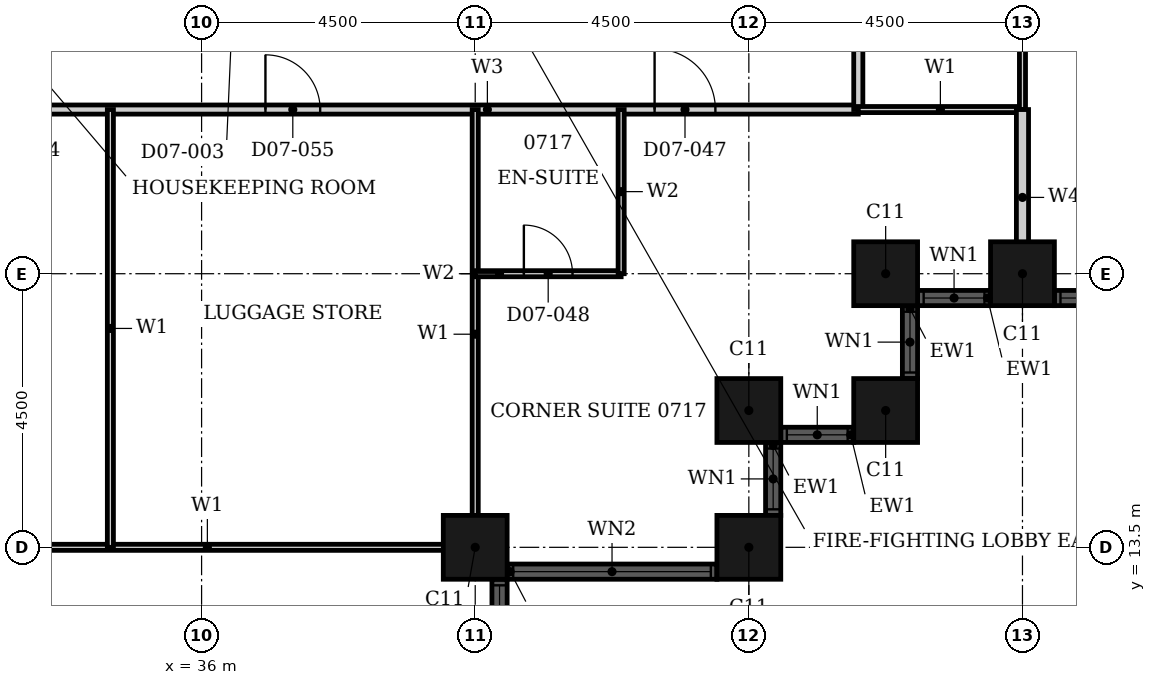
"""IFC4 building model, lengths in metres.
Left out: names, types, materials, properties, quantities, classifications, styles, units other than length and angle.
Written with IfcOpenShell. Run it as: python <this file> out.ifc"""

import sys

from ifc_helpers import new_model, si_unit, direction, frame, frame_2d, origin, origin_2d, place, context, subcontext, project, spatial, rectangle, hollow_rectangle, extrude, element, fill, save


model = new_model("IFC4")
c1 = context("Model", 3, precision=1e-05, world=origin(), true_north=direction((0.0, 1.0)))
c2 = subcontext(c1, "Body", "Model", "MODEL_VIEW")
j1 = project(units=[si_unit("LENGTHUNIT", "METRE"), si_unit("PLANEANGLEUNIT", "RADIAN")], contexts=[c1])
p1 = place(None, origin())
s1 = spatial("IfcSite", under=j1, at=p1, CompositionType="ELEMENT")
p2 = place(p1, origin())
s2 = spatial("IfcBuilding", under=s1, at=p2, CompositionType="ELEMENT")
p3 = place(p2, frame((0.0, 0.0, 37.2)))
s3 = spatial("IfcBuildingStorey", under=s2, at=p3, CompositionType="ELEMENT", Elevation=37.2)
for number, where, z_axis, x_axis in (
    (1, (40.5, 13.5, 0.0), (0.0, 0.0, 1.0), (1.0, 0.0, 0.0)),
    (2, (45.0, 13.5, 0.0), (0.0, 0.0, 1.0), (1.0, 0.0, 0.0)),
    (3, (45.0, 15.75, 0.0), (0.0, 0.0, 1.0), (1.0, 0.0, 0.0)),
    (4, (47.25, 15.75, 0.0), (0.0, 0.0, 1.0), (1.0, 0.0, 0.0)),
    (5, (47.25, 18.0, 0.0), (0.0, 0.0, 1.0), (1.0, 0.0, 0.0)),
    (6, (49.5, 18.0, 0.0), (0.0, 0.0, 1.0), (1.0, 0.0, 0.0)),
):
    element("IfcColumn", number, at=place(p3, frame(where, z_axis=z_axis, x_axis=x_axis)), inside=s3, PredefinedType="COLUMN", context=c2, shape_type="SweptSolid", body=[
        extrude(hollow_rectangle(XDim=1.05, YDim=1.05, WallThickness=0.034, at=origin_2d()), origin(), (0.0, 0.0, 1.0), 3.6),
    ])
p4 = place(p3, frame((40.9, 5.025, 0.0), z_axis=(0.0, 0.0, 1.0), x_axis=(0.0, 1.0, 0.0)))
e7 = element("IfcWall", 7, at=p4, inside=s3, PredefinedType="SOLIDWALL", context=c2, shape_type="SweptSolid", body=[
    extrude(rectangle(XDim=7.95, YDim=0.25, at=frame_2d((3.975, 0.0))), origin(), (0.0, 0.0, 1.0), 3.6),
])
p5 = place(p4, frame((0.1, 0.0, 0.9)))
e8 = element("IfcOpeningElement", 8, at=p5, cuts=e7, PredefinedType="OPENING", context=c2, shape_type="SweptSolid", body=[
    extrude(rectangle(XDim=3.25, YDim=2.08, at=frame_2d((1.625, 1.04))), frame((0.0, 0.135, 0.0), z_axis=(0.0, -1.0, 0.0), x_axis=(1.0, 0.0, 0.0)), (0.0, 0.0, 1.0), 0.27),
])
p6 = place(p4, frame((4.6, 0.0, 0.9)))
e9 = element("IfcOpeningElement", 9, at=p6, cuts=e7, PredefinedType="OPENING", context=c2, shape_type="SweptSolid", body=[
    extrude(rectangle(XDim=3.25, YDim=2.08, at=frame_2d((1.625, 1.04))), frame((0.0, 0.135, 0.0), z_axis=(0.0, -1.0, 0.0), x_axis=(1.0, 0.0, 0.0)), (0.0, 0.0, 1.0), 0.27),
])
p7 = place(p3, frame((41.025, 13.1, 0.0), z_axis=(0.0, 0.0, 1.0), x_axis=(1.0, 0.0, 0.0)))
e10 = element("IfcWall", 10, at=p7, inside=s3, PredefinedType="SOLIDWALL", context=c2, shape_type="SweptSolid", body=[
    extrude(rectangle(XDim=3.45, YDim=0.25, at=frame_2d((1.725, 0.0))), origin(), (0.0, 0.0, 1.0), 3.6),
])
p8 = place(p7, frame((0.1, 0.0, 0.9)))
e11 = element("IfcOpeningElement", 11, at=p8, cuts=e10, PredefinedType="OPENING", context=c2, shape_type="SweptSolid", body=[
    extrude(rectangle(XDim=3.25, YDim=2.08, at=frame_2d((1.625, 1.04))), frame((0.0, 0.135, 0.0), z_axis=(0.0, -1.0, 0.0), x_axis=(1.0, 0.0, 0.0)), (0.0, 0.0, 1.0), 0.27),
])
p9 = place(p3, frame((45.4, 14.025, 0.0), z_axis=(0.0, 0.0, 1.0), x_axis=(0.0, 1.0, 0.0)))
e12 = element("IfcWall", 12, at=p9, inside=s3, PredefinedType="SOLIDWALL", context=c2, shape_type="SweptSolid", body=[
    extrude(rectangle(XDim=1.2, YDim=0.25, at=frame_2d((0.6, 0.0))), origin(), (0.0, 0.0, 1.0), 3.6),
])
p10 = place(p9, frame((0.1, 0.0, 0.9)))
e13 = element("IfcOpeningElement", 13, at=p10, cuts=e12, PredefinedType="OPENING", context=c2, shape_type="SweptSolid", body=[
    extrude(rectangle(XDim=1.0, YDim=2.08, at=frame_2d((0.5, 1.04))), frame((0.0, 0.135, 0.0), z_axis=(0.0, -1.0, 0.0), x_axis=(1.0, 0.0, 0.0)), (0.0, 0.0, 1.0), 0.27),
])
p11 = place(p3, frame((45.525, 15.35, 0.0), z_axis=(0.0, 0.0, 1.0), x_axis=(1.0, 0.0, 0.0)))
e14 = element("IfcWall", 14, at=p11, inside=s3, PredefinedType="SOLIDWALL", context=c2, shape_type="SweptSolid", body=[
    extrude(rectangle(XDim=1.2, YDim=0.25, at=frame_2d((0.6, 0.0))), origin(), (0.0, 0.0, 1.0), 3.6),
])
p12 = place(p11, frame((0.1, 0.0, 0.9)))
e15 = element("IfcOpeningElement", 15, at=p12, cuts=e14, PredefinedType="OPENING", context=c2, shape_type="SweptSolid", body=[
    extrude(rectangle(XDim=1.0, YDim=2.08, at=frame_2d((0.5, 1.04))), frame((0.0, 0.135, 0.0), z_axis=(0.0, -1.0, 0.0), x_axis=(1.0, 0.0, 0.0)), (0.0, 0.0, 1.0), 0.27),
])
p13 = place(p3, frame((47.65, 16.275, 0.0), z_axis=(0.0, 0.0, 1.0), x_axis=(0.0, 1.0, 0.0)))
e16 = element("IfcWall", 16, at=p13, inside=s3, PredefinedType="SOLIDWALL", context=c2, shape_type="SweptSolid", body=[
    extrude(rectangle(XDim=1.2, YDim=0.25, at=frame_2d((0.6, 0.0))), origin(), (0.0, 0.0, 1.0), 3.6),
])
p14 = place(p13, frame((0.1, 0.0, 0.9)))
e17 = element("IfcOpeningElement", 17, at=p14, cuts=e16, PredefinedType="OPENING", context=c2, shape_type="SweptSolid", body=[
    extrude(rectangle(XDim=1.0, YDim=2.08, at=frame_2d((0.5, 1.04))), frame((0.0, 0.135, 0.0), z_axis=(0.0, -1.0, 0.0), x_axis=(1.0, 0.0, 0.0)), (0.0, 0.0, 1.0), 0.27),
])
p15 = place(p3, frame((47.775, 17.6, 0.0), z_axis=(0.0, 0.0, 1.0), x_axis=(1.0, 0.0, 0.0)))
e18 = element("IfcWall", 18, at=p15, inside=s3, PredefinedType="SOLIDWALL", context=c2, shape_type="SweptSolid", body=[
    extrude(rectangle(XDim=1.2, YDim=0.25, at=frame_2d((0.6, 0.0))), origin(), (0.0, 0.0, 1.0), 3.6),
])
p16 = place(p15, frame((0.1, 0.0, 0.9)))
e19 = element("IfcOpeningElement", 19, at=p16, cuts=e18, PredefinedType="OPENING", context=c2, shape_type="SweptSolid", body=[
    extrude(rectangle(XDim=1.0, YDim=2.08, at=frame_2d((0.5, 1.04))), frame((0.0, 0.135, 0.0), z_axis=(0.0, -1.0, 0.0), x_axis=(1.0, 0.0, 0.0)), (0.0, 0.0, 1.0), 0.27),
])
p17 = place(p3, frame((50.025, 17.6, 0.0), z_axis=(0.0, 0.0, 1.0), x_axis=(1.0, 0.0, 0.0)))
e20 = element("IfcWall", 20, at=p17, inside=s3, PredefinedType="SOLIDWALL", context=c2, shape_type="SweptSolid", body=[
    extrude(rectangle(XDim=7.95, YDim=0.25, at=frame_2d((3.975, 0.0))), origin(), (0.0, 0.0, 1.0), 3.6),
])
p18 = place(p17, frame((0.1, 0.0, 0.9)))
e21 = element("IfcOpeningElement", 21, at=p18, cuts=e20, PredefinedType="OPENING", context=c2, shape_type="SweptSolid", body=[
    extrude(rectangle(XDim=3.25, YDim=2.08, at=frame_2d((1.625, 1.04))), frame((0.0, 0.135, 0.0), z_axis=(0.0, -1.0, 0.0), x_axis=(1.0, 0.0, 0.0)), (0.0, 0.0, 1.0), 0.27),
])
p19 = place(p17, frame((4.6, 0.0, 0.9)))
e22 = element("IfcOpeningElement", 22, at=p19, cuts=e20, PredefinedType="OPENING", context=c2, shape_type="SweptSolid", body=[
    extrude(rectangle(XDim=3.25, YDim=2.08, at=frame_2d((1.625, 1.04))), frame((0.0, 0.135, 0.0), z_axis=(0.0, -1.0, 0.0), x_axis=(1.0, 0.0, 0.0)), (0.0, 0.0, 1.0), 0.27),
])
p20 = place(p3, frame((31.5, 20.7, 0.0), z_axis=(0.0, 0.0, 1.0), x_axis=(1.0, 0.0, 0.0)))
e23 = element("IfcWall", 23, at=p20, inside=s3, PredefinedType="PARTITIONING", context=c2, shape_type="SweptSolid", body=[
    extrude(rectangle(XDim=15.3, YDim=0.15, at=frame_2d((7.65, 0.0))), origin(), (0.0, 0.0, 1.0), 3.3),
])
p21 = place(p20, frame((11.95, 0.0, 0.0)))
e24 = element("IfcOpeningElement", 24, at=p21, cuts=e23, PredefinedType="OPENING", context=c2, shape_type="SweptSolid", body=[
    extrude(rectangle(XDim=1.0, YDim=2.1, at=frame_2d((0.5, 1.05))), frame((0.0, 0.085, 0.0), z_axis=(0.0, -1.0, 0.0), x_axis=(1.0, 0.0, 0.0)), (0.0, 0.0, 1.0), 0.17),
])
p22 = place(p20, frame((1.05, 0.0, 0.0)))
e25 = element("IfcOpeningElement", 25, at=p22, cuts=e23, PredefinedType="OPENING", context=c2, shape_type="SweptSolid", body=[
    extrude(rectangle(XDim=0.9, YDim=2.1, at=frame_2d((0.45, 1.05))), frame((0.0, 0.085, 0.0), z_axis=(0.0, -1.0, 0.0), x_axis=(1.0, 0.0, 0.0)), (0.0, 0.0, 1.0), 0.17),
])
p23 = place(p20, frame((5.55, 0.0, 0.0)))
e26 = element("IfcOpeningElement", 26, at=p23, cuts=e23, PredefinedType="OPENING", context=c2, shape_type="SweptSolid", body=[
    extrude(rectangle(XDim=0.9, YDim=2.1, at=frame_2d((0.45, 1.05))), frame((0.0, 0.085, 0.0), z_axis=(0.0, -1.0, 0.0), x_axis=(1.0, 0.0, 0.0)), (0.0, 0.0, 1.0), 0.17),
])
p24 = place(p3, frame((46.8, 20.7, 0.0), z_axis=(0.0, 0.0, 1.0), x_axis=(0.0, 1.0, 0.0)))
e27 = element("IfcWall", 27, at=p24, inside=s3, PredefinedType="PARTITIONING", context=c2, shape_type="SweptSolid", body=[
    extrude(rectangle(XDim=6.3, YDim=0.15, at=frame_2d((3.15, 0.0))), origin(), (0.0, 0.0, 1.0), 3.3),
])
p25 = place(p24, frame((2.65, 0.0, 0.0)))
e28 = element("IfcOpeningElement", 28, at=p25, cuts=e27, PredefinedType="OPENING", context=c2, shape_type="SweptSolid", body=[
    extrude(rectangle(XDim=0.9, YDim=2.1, at=frame_2d((0.45, 1.05))), frame((0.0, 0.085, 0.0), z_axis=(0.0, -1.0, 0.0), x_axis=(1.0, 0.0, 0.0)), (0.0, 0.0, 1.0), 0.17),
])
p26 = place(p3, frame((31.5, 13.5, 0.0), z_axis=(0.0, 0.0, 1.0), x_axis=(1.0, 0.0, 0.0)))
e29 = element("IfcWall", 29, at=p26, inside=s3, PredefinedType="PARTITIONING", context=c2, shape_type="SweptSolid", body=[
    extrude(rectangle(XDim=9.19, YDim=0.1, at=frame_2d((4.595, 0.0))), origin(), (0.0, 0.0, 1.0), 2.38),
])
p27 = place(p3, frame((46.8, 20.7, 0.0), z_axis=(0.0, 0.0, 1.0), x_axis=(1.0, 0.0, 0.0)))
e30 = element("IfcWall", 30, at=p27, inside=s3, PredefinedType="PARTITIONING", context=c2, shape_type="SweptSolid", body=[
    extrude(rectangle(XDim=2.7, YDim=0.1, at=frame_2d((1.35, 0.0))), origin(), (0.0, 0.0, 1.0), 3.3),
])
p28 = place(p3, frame((34.5, 13.5, 0.0), z_axis=(0.0, 0.0, 1.0), x_axis=(0.0, 1.0, 0.0)))
e31 = element("IfcWall", 31, at=p28, inside=s3, PredefinedType="PARTITIONING", context=c2, shape_type="SweptSolid", body=[
    extrude(rectangle(XDim=7.2, YDim=0.1, at=frame_2d((3.6, 0.0))), origin(), (0.0, 0.0, 1.0), 3.3),
])
p29 = place(p3, frame((40.5, 13.31, 0.0), z_axis=(0.0, 0.0, 1.0), x_axis=(0.0, 1.0, 0.0)))
e32 = element("IfcWall", 32, at=p29, inside=s3, PredefinedType="PARTITIONING", context=c2, shape_type="SweptSolid", body=[
    extrude(rectangle(XDim=7.39, YDim=0.1, at=frame_2d((3.695, 0.0))), origin(), (0.0, 0.0, 1.0), 3.3),
])
p30 = place(p3, frame((49.5, 20.7, 0.0), z_axis=(0.0, 0.0, 1.0), x_axis=(0.0, 1.0, 0.0)))
e33 = element("IfcWall", 33, at=p30, inside=s3, PredefinedType="PARTITIONING", context=c2, shape_type="SweptSolid", body=[
    extrude(rectangle(XDim=6.3, YDim=0.1, at=frame_2d((3.15, 0.0))), origin(), (0.0, 0.0, 1.0), 2.38),
])
p31 = place(p3, frame((49.5, 17.81, 0.0), z_axis=(0.0, 0.0, 1.0), x_axis=(0.0, 1.0, 0.0)))
e34 = element("IfcWall", 34, at=p31, inside=s3, PredefinedType="PARTITIONING", context=c2, shape_type="SweptSolid", body=[
    extrude(rectangle(XDim=2.89, YDim=0.2, at=frame_2d((1.445, 0.0))), origin(), (0.0, 0.0, 1.0), 2.38),
])
p32 = place(p3, frame((40.5, 18.0, 0.0), z_axis=(0.0, 0.0, 1.0), x_axis=(1.0, 0.0, 0.0)))
e35 = element("IfcWall", 35, at=p32, inside=s3, PredefinedType="PARTITIONING", context=c2, shape_type="SweptSolid", body=[
    extrude(rectangle(XDim=2.4, YDim=0.1, at=frame_2d((1.2, 0.0))), origin(), (0.0, 0.0, 1.0), 3.3),
])
p33 = place(p32, frame((0.8, 0.0, 0.0)))
e36 = element("IfcOpeningElement", 36, at=p33, cuts=e35, PredefinedType="OPENING", context=c2, shape_type="SweptSolid", body=[
    extrude(rectangle(XDim=0.8, YDim=2.1, at=frame_2d((0.4, 1.05))), frame((0.0, 0.06, 0.0), z_axis=(0.0, -1.0, 0.0), x_axis=(1.0, 0.0, 0.0)), (0.0, 0.0, 1.0), 0.12),
])
p34 = place(p3, frame((42.9, 18.0, 0.0), z_axis=(0.0, 0.0, 1.0), x_axis=(0.0, 1.0, 0.0)))
e37 = element("IfcWall", 37, at=p34, inside=s3, PredefinedType="PARTITIONING", context=c2, shape_type="SweptSolid", body=[
    extrude(rectangle(XDim=2.7, YDim=0.1, at=frame_2d((1.35, 0.0))), origin(), (0.0, 0.0, 1.0), 3.3),
])
p35 = place(p6, origin())
e38 = element("IfcWindow", 38, at=p35, inside=s3, PartitioningType="SINGLE_PANEL", PredefinedType="WINDOW", context=c2, shape_type="SweptSolid", body=[
    extrude(rectangle(XDim=3.25, YDim=2.08, at=frame_2d((1.625, 1.04))), frame((0.0, 0.03, 0.0), z_axis=(0.0, -1.0, 0.0), x_axis=(1.0, 0.0, 0.0)), (0.0, 0.0, 1.0), 0.06),
])
fill(e9, e38)
p36 = place(p8, origin())
e39 = element("IfcWindow", 39, at=p36, inside=s3, PartitioningType="SINGLE_PANEL", PredefinedType="WINDOW", context=c2, shape_type="SweptSolid", body=[
    extrude(rectangle(XDim=3.25, YDim=2.08, at=frame_2d((1.625, 1.04))), frame((0.0, 0.03, 0.0), z_axis=(0.0, -1.0, 0.0), x_axis=(1.0, 0.0, 0.0)), (0.0, 0.0, 1.0), 0.06),
])
fill(e11, e39)
p37 = place(p10, origin())
e40 = element("IfcWindow", 40, at=p37, inside=s3, PartitioningType="SINGLE_PANEL", PredefinedType="WINDOW", context=c2, shape_type="SweptSolid", body=[
    extrude(rectangle(XDim=1.0, YDim=2.08, at=frame_2d((0.5, 1.04))), frame((0.0, 0.03, 0.0), z_axis=(0.0, -1.0, 0.0), x_axis=(1.0, 0.0, 0.0)), (0.0, 0.0, 1.0), 0.06),
])
fill(e13, e40)
p38 = place(p12, origin())
e41 = element("IfcWindow", 41, at=p38, inside=s3, PartitioningType="SINGLE_PANEL", PredefinedType="WINDOW", context=c2, shape_type="SweptSolid", body=[
    extrude(rectangle(XDim=1.0, YDim=2.08, at=frame_2d((0.5, 1.04))), frame((0.0, 0.03, 0.0), z_axis=(0.0, -1.0, 0.0), x_axis=(1.0, 0.0, 0.0)), (0.0, 0.0, 1.0), 0.06),
])
fill(e15, e41)
p39 = place(p14, origin())
e42 = element("IfcWindow", 42, at=p39, inside=s3, PartitioningType="SINGLE_PANEL", PredefinedType="WINDOW", context=c2, shape_type="SweptSolid", body=[
    extrude(rectangle(XDim=1.0, YDim=2.08, at=frame_2d((0.5, 1.04))), frame((0.0, 0.03, 0.0), z_axis=(0.0, -1.0, 0.0), x_axis=(1.0, 0.0, 0.0)), (0.0, 0.0, 1.0), 0.06),
])
fill(e17, e42)
p40 = place(p16, origin())
e43 = element("IfcWindow", 43, at=p40, inside=s3, PartitioningType="SINGLE_PANEL", PredefinedType="WINDOW", context=c2, shape_type="SweptSolid", body=[
    extrude(rectangle(XDim=1.0, YDim=2.08, at=frame_2d((0.5, 1.04))), frame((0.0, 0.03, 0.0), z_axis=(0.0, -1.0, 0.0), x_axis=(1.0, 0.0, 0.0)), (0.0, 0.0, 1.0), 0.06),
])
fill(e19, e43)
p41 = place(p18, origin())
e44 = element("IfcWindow", 44, at=p41, inside=s3, PartitioningType="SINGLE_PANEL", PredefinedType="WINDOW", context=c2, shape_type="SweptSolid", body=[
    extrude(rectangle(XDim=3.25, YDim=2.08, at=frame_2d((1.625, 1.04))), frame((0.0, 0.03, 0.0), z_axis=(0.0, -1.0, 0.0), x_axis=(1.0, 0.0, 0.0)), (0.0, 0.0, 1.0), 0.06),
])
fill(e21, e44)
p42 = place(p21, origin())
e45 = element("IfcDoor", 45, at=p42, inside=s3, OperationType="SINGLE_SWING_RIGHT", PredefinedType="DOOR", context=c2, shape_type="SweptSolid", body=[
    extrude(rectangle(XDim=1.0, YDim=2.1, at=frame_2d((0.5, 1.05))), frame((0.0, 0.025, 0.0), z_axis=(0.0, -1.0, 0.0), x_axis=(1.0, 0.0, 0.0)), (0.0, 0.0, 1.0), 0.05),
])
fill(e24, e45)
p43 = place(p33, origin())
e46 = element("IfcDoor", 46, at=p43, inside=s3, OperationType="SINGLE_SWING_RIGHT", PredefinedType="DOOR", context=c2, shape_type="SweptSolid", body=[
    extrude(rectangle(XDim=0.8, YDim=2.1, at=frame_2d((0.4, 1.05))), frame((0.0, 0.025, 0.0), z_axis=(0.0, -1.0, 0.0), x_axis=(1.0, 0.0, 0.0)), (0.0, 0.0, 1.0), 0.05),
])
fill(e36, e46)
p44 = place(p23, origin())
e47 = element("IfcDoor", 47, at=p44, inside=s3, OperationType="SINGLE_SWING_LEFT", PredefinedType="DOOR", context=c2, shape_type="SweptSolid", body=[
    extrude(rectangle(XDim=0.9, YDim=2.1, at=frame_2d((0.45, 1.05))), frame((0.0, 0.025, 0.0), z_axis=(0.0, -1.0, 0.0), x_axis=(1.0, 0.0, 0.0)), (0.0, 0.0, 1.0), 0.05),
])
fill(e26, e47)
save(model, sys.argv[1])
